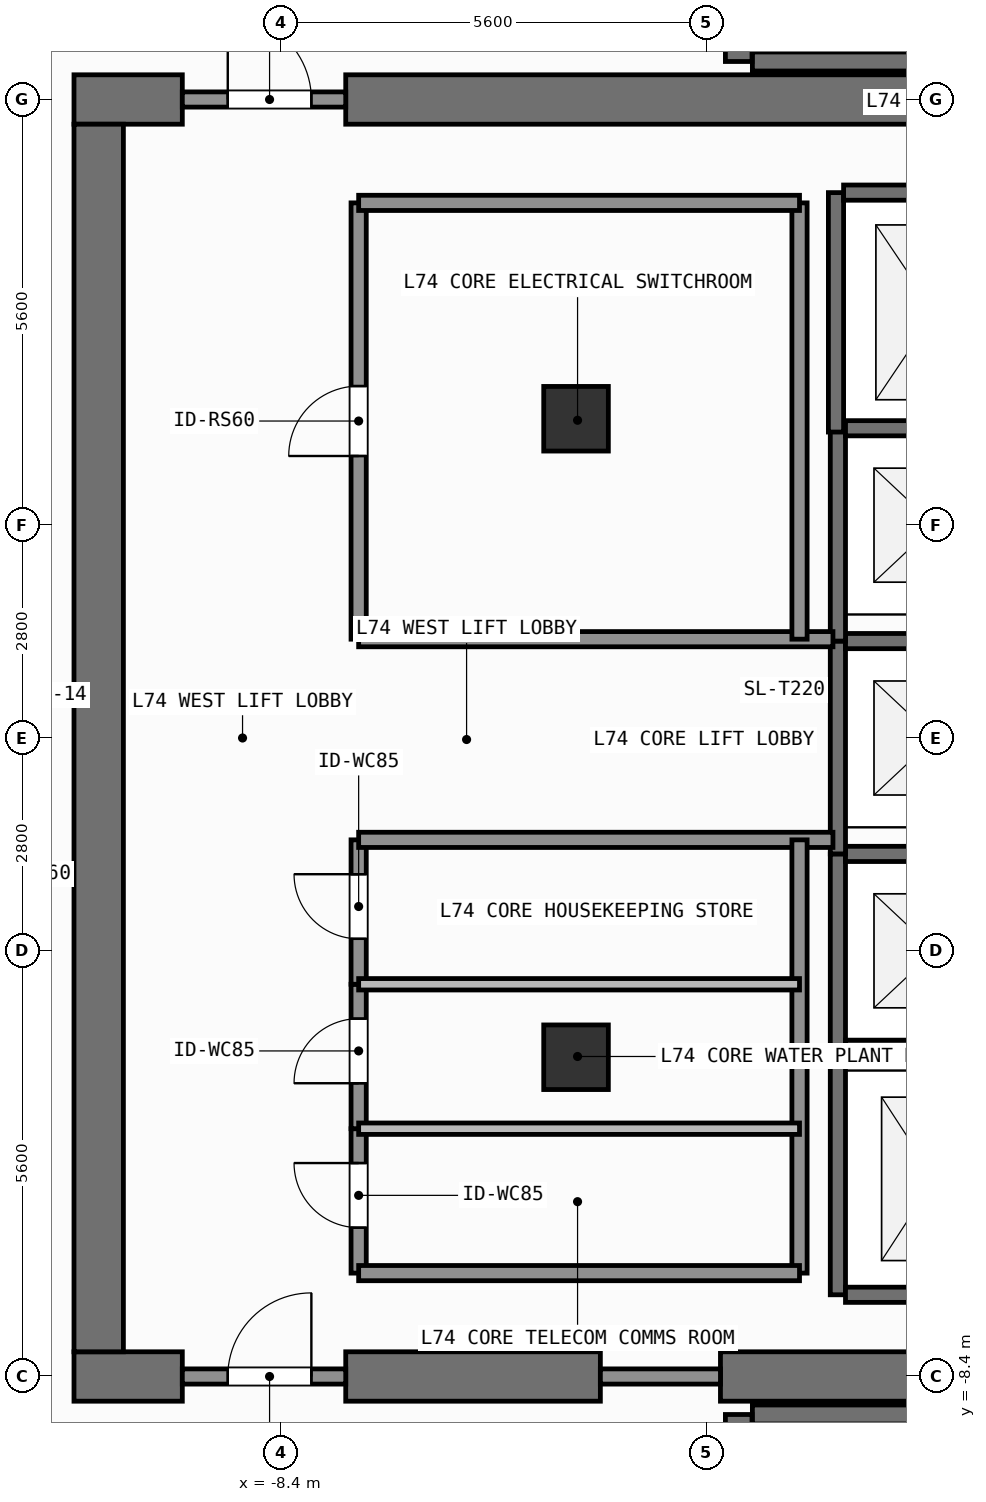
"""IFC4 building model, lengths in metres.
Left out: names, types, materials, properties, quantities, classifications, styles, units other than length and angle.
Written with IfcOpenShell. Run it as: python <this file> out.ifc"""

import sys

from ifc_helpers import new_model, si_unit, direction, frame, frame_2d, origin, origin_2d, place, context, subcontext, project, spatial, rectangle, extrude, element, fill, save


model = new_model("IFC4")
c1 = context("Model", 3, precision=1e-05, world=origin(), true_north=direction((0.0, 1.0)))
c2 = subcontext(c1, "Body", "Model", "MODEL_VIEW")
j1 = project(units=[si_unit("LENGTHUNIT", "METRE"), si_unit("PLANEANGLEUNIT", "RADIAN")], contexts=[c1])
p1 = place(None, origin())
s1 = spatial("IfcSite", under=j1, at=p1, CompositionType="ELEMENT")
p2 = place(p1, origin())
s2 = spatial("IfcBuilding", under=s1, at=p2, CompositionType="ELEMENT")
p3 = place(p2, frame((0.0, 0.0, 301.5)))
s3 = spatial("IfcBuildingStorey", under=s2, at=p3, CompositionType="ELEMENT", Elevation=301.5)
p4 = place(p3, frame((-11.125, -8.4, 0.0), z_axis=(0.0, 0.0, 1.0), x_axis=(1.0, 0.0, 0.0)))
e1 = element("IfcWall", 1, at=p4, inside=s3, PredefinedType="SHEAR", context=c2, shape_type="SweptSolid", body=[
    extrude(rectangle(XDim=1.425, YDim=0.65, at=frame_2d((0.712, 0.0))), origin(), (0.0, 0.0, 1.0), 3.9),
])
p5 = place(p3, frame((-7.55, -8.4, 0.0), z_axis=(0.0, 0.0, 1.0), x_axis=(1.0, 0.0, 0.0)))
e2 = element("IfcWall", 2, at=p5, inside=s3, PredefinedType="SHEAR", context=c2, shape_type="SweptSolid", body=[
    extrude(rectangle(XDim=3.35, YDim=0.65, at=frame_2d((1.675, 0.0))), origin(), (0.0, 0.0, 1.0), 3.9),
])
p6 = place(p3, frame((-2.62, -8.4, 0.0), z_axis=(0.0, 0.0, 1.0), x_axis=(1.0, 0.0, 0.0)))
e3 = element("IfcWall", 3, at=p6, inside=s3, PredefinedType="SHEAR", context=c2, shape_type="SweptSolid", body=[
    extrude(rectangle(XDim=7.27, YDim=0.65, at=frame_2d((3.635, 0.0))), origin(), (0.0, 0.0, 1.0), 3.9),
])
p7 = place(p3, frame((-11.125, 8.4, 0.0), z_axis=(0.0, 0.0, 1.0), x_axis=(1.0, 0.0, 0.0)))
e4 = element("IfcWall", 4, at=p7, inside=s3, PredefinedType="SHEAR", context=c2, shape_type="SweptSolid", body=[
    extrude(rectangle(XDim=1.425, YDim=0.65, at=frame_2d((0.712, 0.0))), origin(), (0.0, 0.0, 1.0), 3.9),
])
p8 = place(p3, frame((-7.55, 8.4, 0.0), z_axis=(0.0, 0.0, 1.0), x_axis=(1.0, 0.0, 0.0)))
e5 = element("IfcWall", 5, at=p8, inside=s3, PredefinedType="SHEAR", context=c2, shape_type="SweptSolid", body=[
    extrude(rectangle(XDim=16.275, YDim=0.65, at=frame_2d((8.138, 0.0))), origin(), (0.0, 0.0, 1.0), 3.9),
])
p9 = place(p3, frame((-10.8, -8.075, 0.0), z_axis=(0.0, 0.0, 1.0), x_axis=(0.0, 1.0, 0.0)))
e6 = element("IfcWall", 6, at=p9, inside=s3, PredefinedType="SHEAR", context=c2, shape_type="SweptSolid", body=[
    extrude(rectangle(XDim=16.15, YDim=0.65, at=frame_2d((8.075, 0.0))), origin(), (0.0, 0.0, 1.0), 3.9),
])
p10 = place(p3, frame((-2.2, -8.9, 0.0), z_axis=(0.0, 0.0, 1.0), x_axis=(1.0, 0.0, 0.0)))
e7 = element("IfcWall", 7, at=p10, inside=s3, PredefinedType="SHEAR", context=c2, shape_type="SweptSolid", body=[
    extrude(rectangle(XDim=6.6, YDim=0.25, at=frame_2d((3.3, 0.0))), origin(), (0.0, 0.0, 1.0), 3.9),
])
p11 = place(p3, frame((-2.38, -11.825, 0.0), z_axis=(0.0, 0.0, 1.0), x_axis=(0.0, 1.0, 0.0)))
e8 = element("IfcWall", 8, at=p11, inside=s3, PredefinedType="SHEAR", context=c2, shape_type="SweptSolid", body=[
    extrude(rectangle(XDim=2.925, YDim=0.35, at=frame_2d((1.462, 0.0))), origin(), (0.0, 0.0, 1.0), 3.9),
])
p12 = place(p3, frame((-2.2, 8.9, 0.0), z_axis=(0.0, 0.0, 1.0), x_axis=(1.0, 0.0, 0.0)))
e9 = element("IfcWall", 9, at=p12, inside=s3, PredefinedType="SHEAR", context=c2, shape_type="SweptSolid", body=[
    extrude(rectangle(XDim=6.6, YDim=0.25, at=frame_2d((3.3, 0.0))), origin(), (0.0, 0.0, 1.0), 3.9),
])
p13 = place(p3, frame((-2.38, 8.9, 0.0), z_axis=(0.0, 0.0, 1.0), x_axis=(0.0, 1.0, 0.0)))
e10 = element("IfcWall", 10, at=p13, inside=s3, PredefinedType="SHEAR", context=c2, shape_type="SweptSolid", body=[
    extrude(rectangle(XDim=2.925, YDim=0.35, at=frame_2d((1.462, 0.0))), origin(), (0.0, 0.0, 1.0), 3.9),
])
for number, where, z_axis, x_axis in (
    (11, (-4.52, -4.2, 0.0), (0.0, 0.0, 1.0), (1.0, 0.0, 0.0)),
    (12, (-4.52, 4.2, 0.0), (0.0, 0.0, 1.0), (1.0, 0.0, 0.0)),
):
    element("IfcColumn", number, at=place(p3, frame(where, z_axis=z_axis, x_axis=x_axis)), inside=s3, PredefinedType="COLUMN", context=c2, shape_type="SweptSolid", body=[
        extrude(rectangle(XDim=0.85, YDim=0.85, at=origin_2d()), origin(), (0.0, 0.0, 1.0), 3.9),
    ])
p14 = place(p3, frame((-1.075, -4.275, 0.0), z_axis=(0.0, 0.0, 1.0), x_axis=(0.0, 1.0, 0.0)))
e13 = element("IfcWall", 13, at=p14, inside=s3, PredefinedType="SHEAR", context=c2, shape_type="SweptSolid", body=[
    extrude(rectangle(XDim=2.75, YDim=0.2, at=frame_2d((1.375, 0.0))), origin(), (0.0, 0.0, 1.0), 3.68),
])
for number, where, z_axis, x_axis in (
    (14, (-0.975, -4.075, 0.0), (0.0, 0.0, 1.0), (1.0, 0.0, 0.0)),
    (15, (-0.975, -1.525, 0.0), (0.0, 0.0, 1.0), (1.0, 0.0, 0.0)),
):
    element("IfcWall", number, at=place(p3, frame(where, z_axis=z_axis, x_axis=x_axis)), inside=s3, PredefinedType="SHEAR", context=c2, shape_type="SweptSolid", body=[
        extrude(rectangle(XDim=2.35, YDim=0.2, at=frame_2d((1.175, 0.0))), origin(), (0.0, 0.0, 1.0), 3.68),
    ])
p15 = place(p3, frame((-1.075, -1.525, 0.0), z_axis=(0.0, 0.0, 1.0), x_axis=(0.0, 1.0, 0.0)))
e16 = element("IfcWall", 16, at=p15, inside=s3, PredefinedType="SHEAR", context=c2, shape_type="SweptSolid", body=[
    extrude(rectangle(XDim=2.8, YDim=0.2, at=frame_2d((1.4, 0.0))), origin(), (0.0, 0.0, 1.0), 3.68),
])
p16 = place(p3, frame((-0.975, 1.275, 0.0), z_axis=(0.0, 0.0, 1.0), x_axis=(1.0, 0.0, 0.0)))
e17 = element("IfcWall", 17, at=p16, inside=s3, PredefinedType="SHEAR", context=c2, shape_type="SweptSolid", body=[
    extrude(rectangle(XDim=2.35, YDim=0.2, at=frame_2d((1.175, 0.0))), origin(), (0.0, 0.0, 1.0), 3.68),
])
p17 = place(p3, frame((-1.075, 1.275, 0.0), z_axis=(0.0, 0.0, 1.0), x_axis=(0.0, 1.0, 0.0)))
e18 = element("IfcWall", 18, at=p17, inside=s3, PredefinedType="SHEAR", context=c2, shape_type="SweptSolid", body=[
    extrude(rectangle(XDim=2.8, YDim=0.2, at=frame_2d((1.4, 0.0))), origin(), (0.0, 0.0, 1.0), 3.68),
])
p18 = place(p3, frame((-0.975, 4.075, 0.0), z_axis=(0.0, 0.0, 1.0), x_axis=(1.0, 0.0, 0.0)))
e19 = element("IfcWall", 19, at=p18, inside=s3, PredefinedType="SHEAR", context=c2, shape_type="SweptSolid", body=[
    extrude(rectangle(XDim=2.35, YDim=0.2, at=frame_2d((1.175, 0.0))), origin(), (0.0, 0.0, 1.0), 3.68),
])
p19 = place(p3, frame((-1.1, 4.025, 0.0), z_axis=(0.0, 0.0, 1.0), x_axis=(0.0, 1.0, 0.0)))
e20 = element("IfcWall", 20, at=p19, inside=s3, PredefinedType="SHEAR", context=c2, shape_type="SweptSolid", body=[
    extrude(rectangle(XDim=3.15, YDim=0.2, at=frame_2d((1.575, 0.0))), origin(), (0.0, 0.0, 1.0), 3.68),
])
p20 = place(p3, frame((-1.0, 7.175, 0.0), z_axis=(0.0, 0.0, 1.0), x_axis=(1.0, 0.0, 0.0)))
e21 = element("IfcWall", 21, at=p20, inside=s3, PredefinedType="SHEAR", context=c2, shape_type="SweptSolid", body=[
    extrude(rectangle(XDim=2.4, YDim=0.2, at=frame_2d((1.2, 0.0))), origin(), (0.0, 0.0, 1.0), 3.68),
])
p21 = place(p3, frame((-1.075, -7.325, 0.0), z_axis=(0.0, 0.0, 1.0), x_axis=(0.0, 1.0, 0.0)))
e22 = element("IfcWall", 22, at=p21, inside=s3, PredefinedType="SHEAR", context=c2, shape_type="SweptSolid", body=[
    extrude(rectangle(XDim=3.05, YDim=0.2, at=frame_2d((1.525, 0.0))), origin(), (0.0, 0.0, 1.0), 3.68),
])
p22 = place(p3, frame((-0.975, -7.325, 0.0), z_axis=(0.0, 0.0, 1.0), x_axis=(1.0, 0.0, 0.0)))
e23 = element("IfcWall", 23, at=p22, inside=s3, PredefinedType="SHEAR", context=c2, shape_type="SweptSolid", body=[
    extrude(rectangle(XDim=2.35, YDim=0.2, at=frame_2d((1.175, 0.0))), origin(), (0.0, 0.0, 1.0), 3.68),
])
p23 = place(p3, frame((-9.7, -8.4, 0.0), z_axis=(0.0, 0.0, 1.0), x_axis=(1.0, 0.0, 0.0)))
e24 = element("IfcWall", 24, at=p23, inside=s3, PredefinedType="SOLIDWALL", context=c2, shape_type="SweptSolid", body=[
    extrude(rectangle(XDim=2.15, YDim=0.2, at=frame_2d((1.075, 0.0))), origin(), (0.0, 0.0, 1.0), 2.92),
])
p24 = place(p23, frame((0.598, 0.0, 0.0)))
e25 = element("IfcOpeningElement", 25, at=p24, cuts=e24, PredefinedType="OPENING", context=c2, shape_type="SweptSolid", body=[
    extrude(rectangle(XDim=1.1, YDim=2.15, at=frame_2d((0.55, 1.075))), frame((0.0, 0.11, 0.0), z_axis=(0.0, -1.0, 0.0), x_axis=(1.0, 0.0, 0.0)), (0.0, 0.0, 1.0), 0.22),
])
p25 = place(p3, frame((-9.7, 8.4, 0.0), z_axis=(0.0, 0.0, 1.0), x_axis=(1.0, 0.0, 0.0)))
e26 = element("IfcWall", 26, at=p25, inside=s3, PredefinedType="SOLIDWALL", context=c2, shape_type="SweptSolid", body=[
    extrude(rectangle(XDim=2.15, YDim=0.2, at=frame_2d((1.075, 0.0))), origin(), (0.0, 0.0, 1.0), 2.92),
])
p26 = place(p25, frame((0.598, 0.0, 0.0)))
e27 = element("IfcOpeningElement", 27, at=p26, cuts=e26, PredefinedType="OPENING", context=c2, shape_type="SweptSolid", body=[
    extrude(rectangle(XDim=1.1, YDim=2.15, at=frame_2d((0.55, 1.075))), frame((0.0, 0.11, 0.0), z_axis=(0.0, -1.0, 0.0), x_axis=(1.0, 0.0, 0.0)), (0.0, 0.0, 1.0), 0.22),
])
p27 = place(p3, frame((-7.38, -7.04, 0.0), z_axis=(0.0, 0.0, 1.0), x_axis=(0.0, 1.0, 0.0)))
e28 = element("IfcWall", 28, at=p27, inside=s3, PredefinedType="SOLIDWALL", context=c2, shape_type="SweptSolid", body=[
    extrude(rectangle(XDim=1.9, YDim=0.2, at=frame_2d((0.95, 0.0))), origin(), (0.0, 0.0, 1.0), 3.68),
])
p28 = place(p27, frame((0.598, 0.0, 0.0)))
e29 = element("IfcOpeningElement", 29, at=p28, cuts=e28, PredefinedType="OPENING", context=c2, shape_type="SweptSolid", body=[
    extrude(rectangle(XDim=0.85, YDim=2.1, at=frame_2d((0.425, 1.05))), frame((0.0, 0.11, 0.0), z_axis=(0.0, -1.0, 0.0), x_axis=(1.0, 0.0, 0.0)), (0.0, 0.0, 1.0), 0.22),
])
p29 = place(p3, frame((-7.38, -5.14, 0.0), z_axis=(0.0, 0.0, 1.0), x_axis=(0.0, 1.0, 0.0)))
e30 = element("IfcWall", 30, at=p29, inside=s3, PredefinedType="SOLIDWALL", context=c2, shape_type="SweptSolid", body=[
    extrude(rectangle(XDim=1.9, YDim=0.2, at=frame_2d((0.95, 0.0))), origin(), (0.0, 0.0, 1.0), 3.68),
])
p30 = place(p29, frame((0.598, 0.0, 0.0)))
e31 = element("IfcOpeningElement", 31, at=p30, cuts=e30, PredefinedType="OPENING", context=c2, shape_type="SweptSolid", body=[
    extrude(rectangle(XDim=0.85, YDim=2.1, at=frame_2d((0.425, 1.05))), frame((0.0, 0.11, 0.0), z_axis=(0.0, -1.0, 0.0), x_axis=(1.0, 0.0, 0.0)), (0.0, 0.0, 1.0), 0.22),
])
p31 = place(p3, frame((-7.38, -3.24, 0.0), z_axis=(0.0, 0.0, 1.0), x_axis=(0.0, 1.0, 0.0)))
e32 = element("IfcWall", 32, at=p31, inside=s3, PredefinedType="SOLIDWALL", context=c2, shape_type="SweptSolid", body=[
    extrude(rectangle(XDim=1.9, YDim=0.2, at=frame_2d((0.95, 0.0))), origin(), (0.0, 0.0, 1.0), 3.68),
])
p32 = place(p31, frame((0.598, 0.0, 0.0)))
e33 = element("IfcOpeningElement", 33, at=p32, cuts=e32, PredefinedType="OPENING", context=c2, shape_type="SweptSolid", body=[
    extrude(rectangle(XDim=0.85, YDim=2.1, at=frame_2d((0.425, 1.05))), frame((0.0, 0.11, 0.0), z_axis=(0.0, -1.0, 0.0), x_axis=(1.0, 0.0, 0.0)), (0.0, 0.0, 1.0), 0.22),
])
p33 = place(p3, frame((-7.38, 1.3, 0.0), z_axis=(0.0, 0.0, 1.0), x_axis=(0.0, 1.0, 0.0)))
e34 = element("IfcWall", 34, at=p33, inside=s3, PredefinedType="SOLIDWALL", context=c2, shape_type="SweptSolid", body=[
    extrude(rectangle(XDim=5.74, YDim=0.2, at=frame_2d((2.87, 0.0))), origin(), (0.0, 0.0, 1.0), 3.68),
])
p34 = place(p33, frame((2.41, 0.0, 0.0)))
e35 = element("IfcOpeningElement", 35, at=p34, cuts=e34, PredefinedType="OPENING", context=c2, shape_type="SweptSolid", body=[
    extrude(rectangle(XDim=0.92, YDim=2.1, at=frame_2d((0.46, 1.05))), frame((0.0, 0.11, 0.0), z_axis=(0.0, -1.0, 0.0), x_axis=(1.0, 0.0, 0.0)), (0.0, 0.0, 1.0), 0.22),
])
p35 = place(p3, frame((-4.2, -8.4, 0.0), z_axis=(0.0, 0.0, 1.0), x_axis=(1.0, 0.0, 0.0)))
e36 = element("IfcWall", 36, at=p35, inside=s3, PredefinedType="SOLIDWALL", context=c2, shape_type="SweptSolid", body=[
    extrude(rectangle(XDim=1.58, YDim=0.2, at=frame_2d((0.79, 0.0))), origin(), (0.0, 0.0, 1.0), 2.92),
])
for number, where, z_axis, x_axis in (
    (37, (-7.38, -1.34, 0.0), (0.0, 0.0, 1.0), (1.0, 0.0, 0.0)),
    (38, (-7.38, 1.3, 0.0), (0.0, 0.0, 1.0), (1.0, 0.0, 0.0)),
):
    element("IfcWall", number, at=place(p3, frame(where, z_axis=z_axis, x_axis=x_axis)), inside=s3, PredefinedType="SOLIDWALL", context=c2, shape_type="SweptSolid", body=[
        extrude(rectangle(XDim=6.24, YDim=0.2, at=frame_2d((3.12, 0.0))), origin(), (0.0, 0.0, 1.0), 3.68),
    ])
p36 = place(p3, frame((-1.58, -7.04, 0.0), z_axis=(0.0, 0.0, 1.0), x_axis=(0.0, 1.0, 0.0)))
e39 = element("IfcWall", 39, at=p36, inside=s3, PredefinedType="SOLIDWALL", context=c2, shape_type="SweptSolid", body=[
    extrude(rectangle(XDim=5.7, YDim=0.2, at=frame_2d((2.85, 0.0))), origin(), (0.0, 0.0, 1.0), 3.68),
])
p37 = place(p3, frame((-7.38, -7.04, 0.0), z_axis=(0.0, 0.0, 1.0), x_axis=(1.0, 0.0, 0.0)))
e40 = element("IfcWall", 40, at=p37, inside=s3, PredefinedType="SOLIDWALL", context=c2, shape_type="SweptSolid", body=[
    extrude(rectangle(XDim=5.8, YDim=0.2, at=frame_2d((2.9, 0.0))), origin(), (0.0, 0.0, 1.0), 3.68),
])
p38 = place(p3, frame((-1.58, 1.3, 0.0), z_axis=(0.0, 0.0, 1.0), x_axis=(0.0, 1.0, 0.0)))
e41 = element("IfcWall", 41, at=p38, inside=s3, PredefinedType="SOLIDWALL", context=c2, shape_type="SweptSolid", body=[
    extrude(rectangle(XDim=5.74, YDim=0.2, at=frame_2d((2.87, 0.0))), origin(), (0.0, 0.0, 1.0), 3.68),
])
p39 = place(p3, frame((-7.38, 7.04, 0.0), z_axis=(0.0, 0.0, 1.0), x_axis=(1.0, 0.0, 0.0)))
e42 = element("IfcWall", 42, at=p39, inside=s3, PredefinedType="SOLIDWALL", context=c2, shape_type="SweptSolid", body=[
    extrude(rectangle(XDim=5.8, YDim=0.2, at=frame_2d((2.9, 0.0))), origin(), (0.0, 0.0, 1.0), 3.68),
])
for number, where, z_axis, x_axis in (
    (43, (-7.38, -5.14, 0.0), (0.0, 0.0, 1.0), (1.0, 0.0, 0.0)),
    (44, (-7.38, -3.24, 0.0), (0.0, 0.0, 1.0), (1.0, 0.0, 0.0)),
):
    element("IfcWall", number, at=place(p3, frame(where, z_axis=z_axis, x_axis=x_axis)), inside=s3, PredefinedType="PARTITIONING", context=c2, shape_type="SweptSolid", body=[
        extrude(rectangle(XDim=5.8, YDim=0.15, at=frame_2d((2.9, 0.0))), origin(), (0.0, 0.0, 1.0), 3.68),
    ])
p40 = place(p24, origin())
e45 = element("IfcDoor", 45, at=p40, inside=s3, OperationType="SINGLE_SWING_RIGHT", PredefinedType="DOOR", context=c2, shape_type="SweptSolid", body=[
    extrude(rectangle(XDim=1.1, YDim=2.15, at=frame_2d((0.55, 1.075))), frame((0.0, 0.025, 0.0), z_axis=(0.0, -1.0, 0.0), x_axis=(1.0, 0.0, 0.0)), (0.0, 0.0, 1.0), 0.05),
])
fill(e25, e45)
p41 = place(p26, origin())
e46 = element("IfcDoor", 46, at=p41, inside=s3, OperationType="SINGLE_SWING_LEFT", PredefinedType="DOOR", context=c2, shape_type="SweptSolid", body=[
    extrude(rectangle(XDim=1.1, YDim=2.15, at=frame_2d((0.55, 1.075))), frame((0.0, 0.025, 0.0), z_axis=(0.0, -1.0, 0.0), x_axis=(1.0, 0.0, 0.0)), (0.0, 0.0, 1.0), 0.05),
])
fill(e27, e46)
p42 = place(p28, origin())
e47 = element("IfcDoor", 47, at=p42, inside=s3, OperationType="SINGLE_SWING_RIGHT", PredefinedType="DOOR", context=c2, shape_type="SweptSolid", body=[
    extrude(rectangle(XDim=0.85, YDim=2.1, at=frame_2d((0.425, 1.05))), frame((0.0, 0.025, 0.0), z_axis=(0.0, -1.0, 0.0), x_axis=(1.0, 0.0, 0.0)), (0.0, 0.0, 1.0), 0.05),
])
fill(e29, e47)
p43 = place(p30, origin())
e48 = element("IfcDoor", 48, at=p43, inside=s3, OperationType="SINGLE_SWING_LEFT", PredefinedType="DOOR", context=c2, shape_type="SweptSolid", body=[
    extrude(rectangle(XDim=0.85, YDim=2.1, at=frame_2d((0.425, 1.05))), frame((0.0, 0.025, 0.0), z_axis=(0.0, -1.0, 0.0), x_axis=(1.0, 0.0, 0.0)), (0.0, 0.0, 1.0), 0.05),
])
fill(e31, e48)
p44 = place(p32, origin())
e49 = element("IfcDoor", 49, at=p44, inside=s3, OperationType="SINGLE_SWING_RIGHT", PredefinedType="DOOR", context=c2, shape_type="SweptSolid", body=[
    extrude(rectangle(XDim=0.85, YDim=2.1, at=frame_2d((0.425, 1.05))), frame((0.0, 0.025, 0.0), z_axis=(0.0, -1.0, 0.0), x_axis=(1.0, 0.0, 0.0)), (0.0, 0.0, 1.0), 0.05),
])
fill(e33, e49)
p45 = place(p34, origin())
e50 = element("IfcDoor", 50, at=p45, inside=s3, OperationType="SINGLE_SWING_LEFT", PredefinedType="DOOR", context=c2, shape_type="SweptSolid", body=[
    extrude(rectangle(XDim=0.92, YDim=2.1, at=frame_2d((0.46, 1.05))), frame((0.0, 0.025, 0.0), z_axis=(0.0, -1.0, 0.0), x_axis=(1.0, 0.0, 0.0)), (0.0, 0.0, 1.0), 0.05),
])
fill(e35, e50)
save(model, sys.argv[1])
